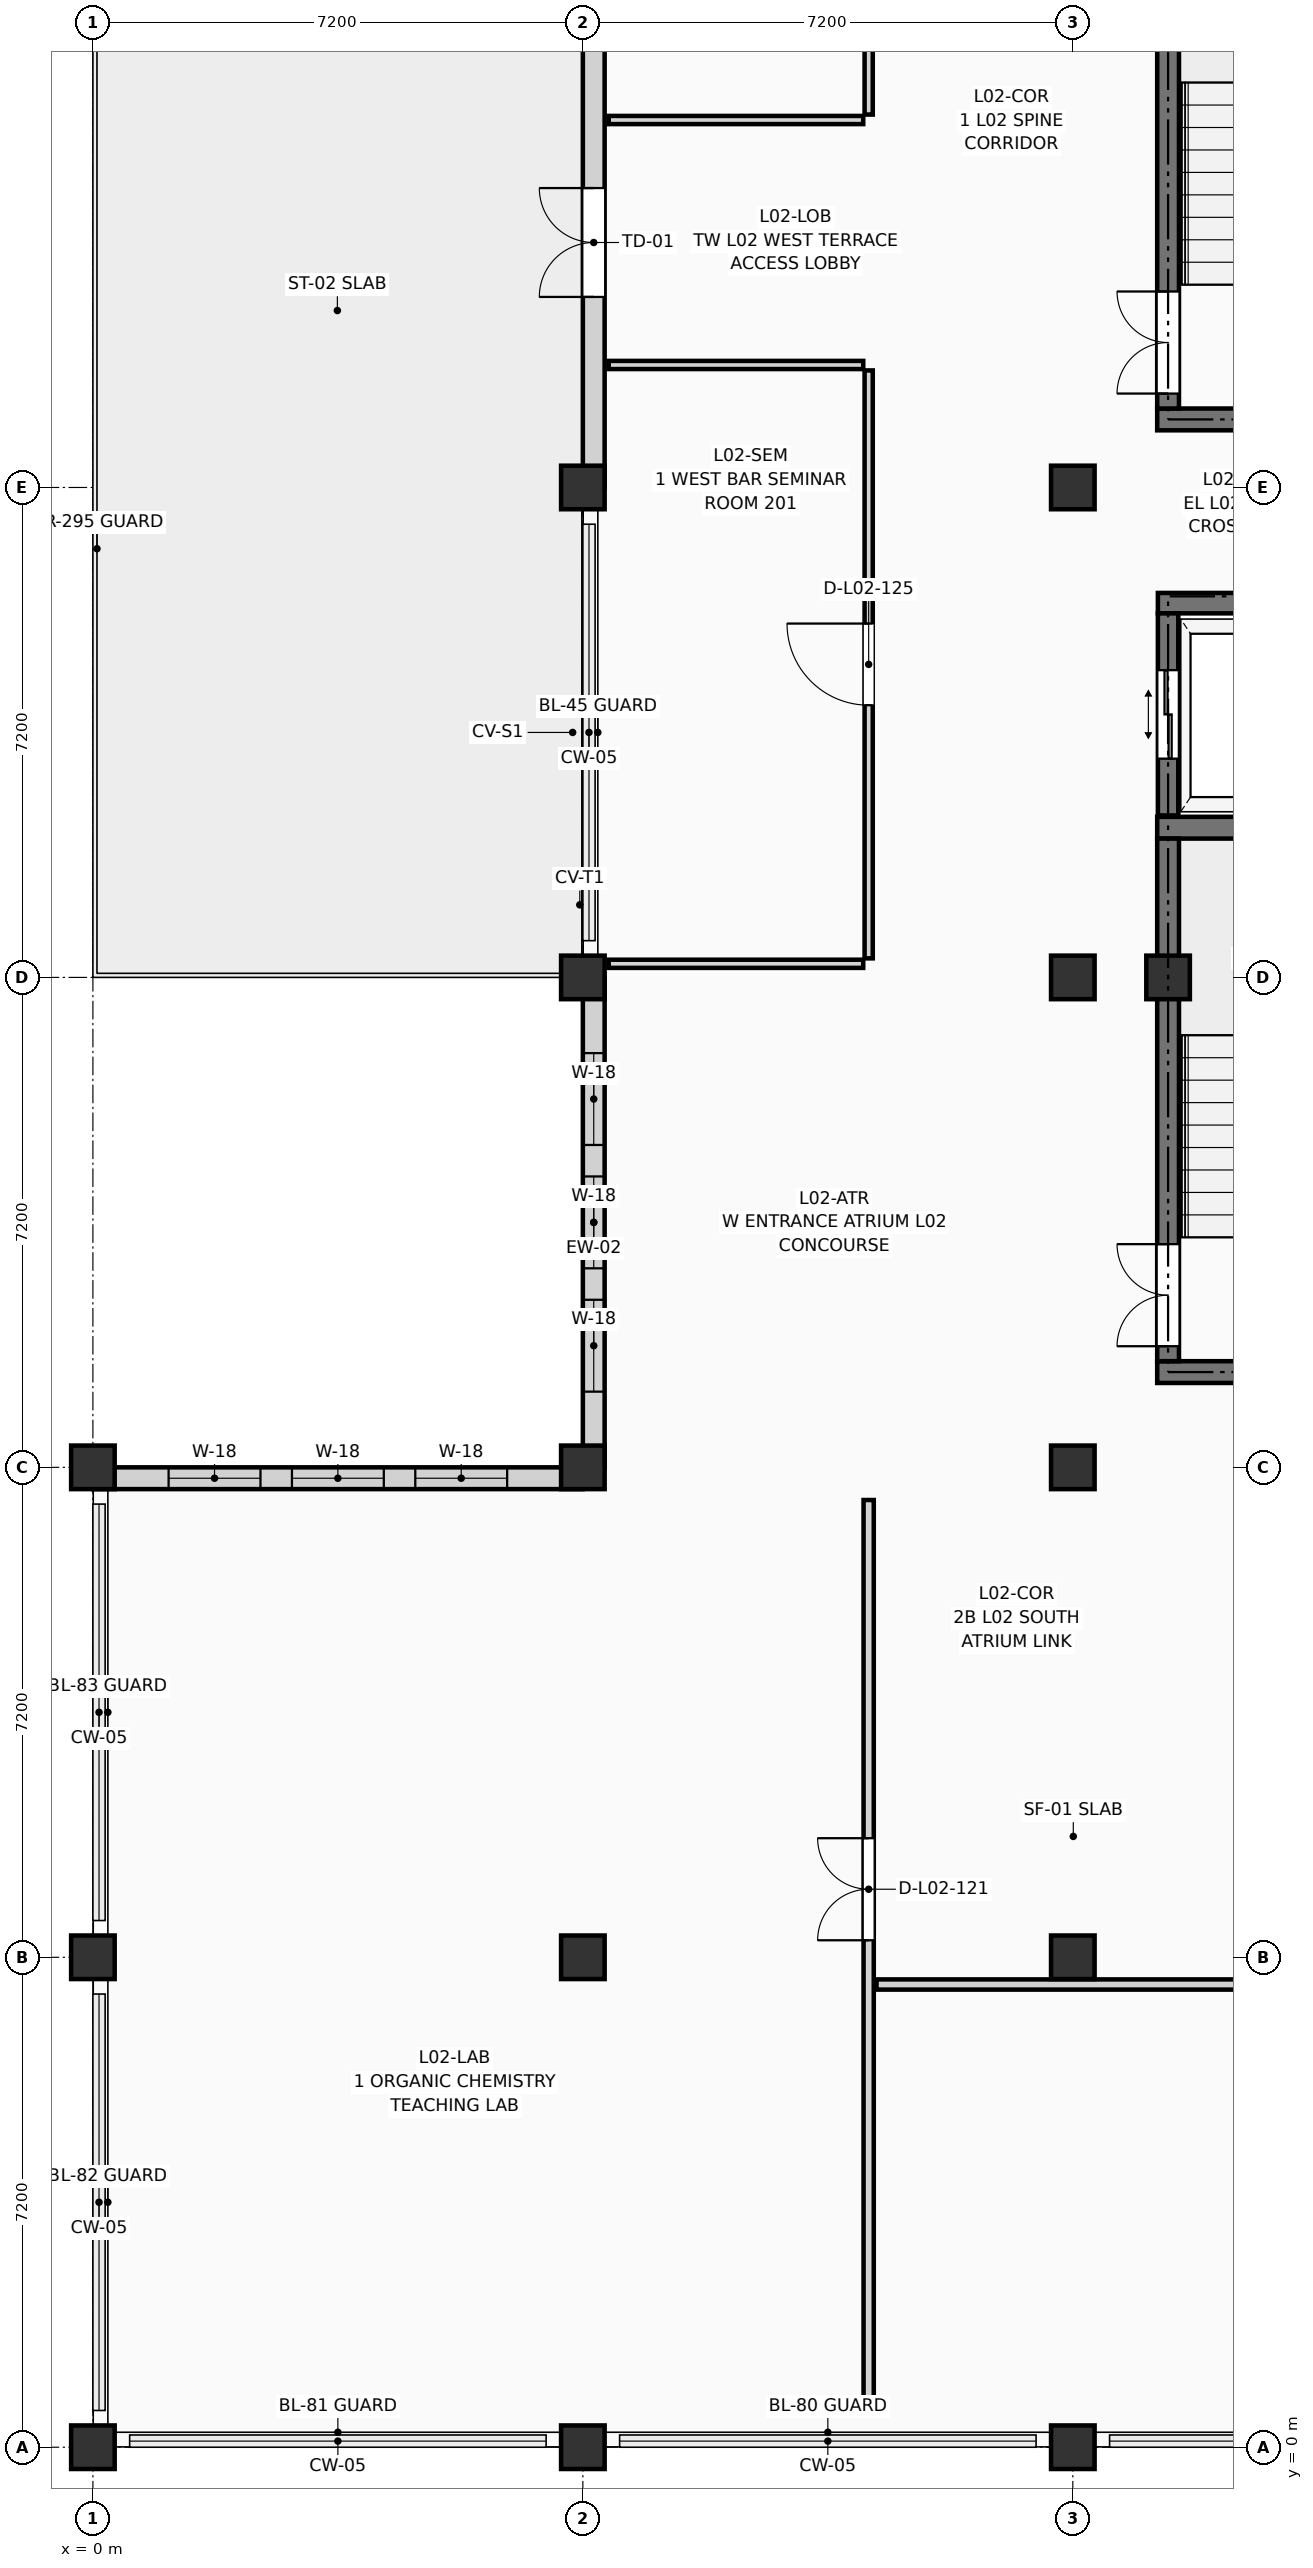
"""IFC4 building model, lengths in metres.
Left out: names, types, materials, properties, quantities, classifications, styles, units other than length and angle.
Written with IfcOpenShell. Run it as: python <this file> out.ifc"""

import sys

from ifc_helpers import new_model, si_unit, direction, frame, frame_2d, origin, origin_2d, place, context, subcontext, project, spatial, rectangle, extrude, element, fill, save


model = new_model("IFC4")
c1 = context("Model", 3, precision=1e-05, world=origin(), true_north=direction((0.0, 1.0)))
c2 = subcontext(c1, "Body", "Model", "MODEL_VIEW")
j1 = project(units=[si_unit("LENGTHUNIT", "METRE"), si_unit("PLANEANGLEUNIT", "RADIAN")], contexts=[c1])
p1 = place(None, origin())
s1 = spatial("IfcSite", under=j1, at=p1, CompositionType="ELEMENT")
p2 = place(p1, origin())
s2 = spatial("IfcBuilding", under=s1, at=p2, CompositionType="ELEMENT")
p3 = place(p2, frame((0.0, 0.0, 8.55)))
s3 = spatial("IfcBuildingStorey", under=s2, at=p3, CompositionType="ELEMENT", Elevation=8.55)
for number, where, z_axis, x_axis in (
    (1, (0.0, 0.0, 0.0), (0.0, 0.0, 1.0), (1.0, 0.0, 0.0)),
    (2, (0.0, 7.2, 0.0), (0.0, 0.0, 1.0), (1.0, 0.0, 0.0)),
    (3, (0.0, 14.4, 0.0), (0.0, 0.0, 1.0), (1.0, 0.0, 0.0)),
    (4, (7.2, 0.0, 0.0), (0.0, 0.0, 1.0), (1.0, 0.0, 0.0)),
    (5, (7.2, 7.2, 0.0), (0.0, 0.0, 1.0), (1.0, 0.0, 0.0)),
    (6, (7.2, 14.4, 0.0), (0.0, 0.0, 1.0), (1.0, 0.0, 0.0)),
    (7, (7.2, 21.6, 0.0), (0.0, 0.0, 1.0), (1.0, 0.0, 0.0)),
    (8, (7.2, 28.8, 0.0), (0.0, 0.0, 1.0), (1.0, 0.0, 0.0)),
    (9, (14.4, 0.0, 0.0), (0.0, 0.0, 1.0), (1.0, 0.0, 0.0)),
    (10, (14.4, 7.2, 0.0), (0.0, 0.0, 1.0), (1.0, 0.0, 0.0)),
    (11, (14.4, 14.4, 0.0), (0.0, 0.0, 1.0), (1.0, 0.0, 0.0)),
    (12, (14.4, 21.6, 0.0), (0.0, 0.0, 1.0), (1.0, 0.0, 0.0)),
    (13, (14.4, 28.8, 0.0), (0.0, 0.0, 1.0), (1.0, 0.0, 0.0)),
    (14, (15.8, 21.6, 0.0), (0.0, 0.0, 1.0), (1.0, 0.0, 0.0)),
):
    element("IfcColumn", number, at=place(p3, frame(where, z_axis=z_axis, x_axis=x_axis)), inside=s3, PredefinedType="COLUMN", context=c2, shape_type="SweptSolid", body=[
        extrude(rectangle(XDim=0.64, YDim=0.64, at=origin_2d()), origin(), (0.0, 0.0, 1.0), 3.6),
    ])
p4 = place(p3, frame((7.36, 14.4, 0.0), z_axis=(0.0, 0.0, 1.0), x_axis=(0.0, 1.0, 0.0)))
e15 = element("IfcWall", 15, at=p4, inside=s3, PredefinedType="SOLIDWALL", context=c2, shape_type="SweptSolid", body=[
    extrude(rectangle(XDim=7.2, YDim=0.32, at=frame_2d((3.6, 0.0))), origin(), (0.0, 0.0, 1.0), 2.84),
])
p5 = place(p4, frame((1.113, 0.0, 0.18)))
e16 = element("IfcOpeningElement", 16, at=p5, cuts=e15, PredefinedType="OPENING", context=c2, shape_type="SweptSolid", body=[
    extrude(rectangle(XDim=1.35, YDim=2.45, at=frame_2d((0.675, 1.225))), frame((0.0, 0.172, 0.0), z_axis=(0.0, -1.0, 0.0), x_axis=(1.0, 0.0, 0.0)), (0.0, 0.0, 1.0), 0.344),
])
p6 = place(p4, frame((2.925, 0.0, 0.18)))
e17 = element("IfcOpeningElement", 17, at=p6, cuts=e15, PredefinedType="OPENING", context=c2, shape_type="SweptSolid", body=[
    extrude(rectangle(XDim=1.35, YDim=2.45, at=frame_2d((0.675, 1.225))), frame((0.0, 0.172, 0.0), z_axis=(0.0, -1.0, 0.0), x_axis=(1.0, 0.0, 0.0)), (0.0, 0.0, 1.0), 0.344),
])
p7 = place(p4, frame((4.738, 0.0, 0.18)))
e18 = element("IfcOpeningElement", 18, at=p7, cuts=e15, PredefinedType="OPENING", context=c2, shape_type="SweptSolid", body=[
    extrude(rectangle(XDim=1.35, YDim=2.45, at=frame_2d((0.675, 1.225))), frame((0.0, 0.172, 0.0), z_axis=(0.0, -1.0, 0.0), x_axis=(1.0, 0.0, 0.0)), (0.0, 0.0, 1.0), 0.344),
])
p8 = place(p3, frame((7.36, 28.8, 0.0), z_axis=(0.0, 0.0, 1.0), x_axis=(0.0, 1.0, 0.0)))
e19 = element("IfcWall", 19, at=p8, inside=s3, PredefinedType="SOLIDWALL", context=c2, shape_type="SweptSolid", body=[
    extrude(rectangle(XDim=7.2, YDim=0.32, at=frame_2d((3.6, 0.0))), origin(), (0.0, 0.0, 1.0), 2.84),
])
p9 = place(p8, frame((2.8, 0.0, 0.0)))
e20 = element("IfcOpeningElement", 20, at=p9, cuts=e19, PredefinedType="OPENING", context=c2, shape_type="SweptSolid", body=[
    extrude(rectangle(XDim=1.6, YDim=2.25, at=frame_2d((0.8, 1.125))), frame((0.0, 0.172, 0.0), z_axis=(0.0, -1.0, 0.0), x_axis=(1.0, 0.0, 0.0)), (0.0, 0.0, 1.0), 0.344),
])
p10 = place(p3, frame((0.0, 14.24, 0.0), z_axis=(0.0, 0.0, 1.0), x_axis=(1.0, 0.0, 0.0)))
e21 = element("IfcWall", 21, at=p10, inside=s3, PredefinedType="SOLIDWALL", context=c2, shape_type="SweptSolid", body=[
    extrude(rectangle(XDim=7.2, YDim=0.32, at=frame_2d((3.6, 0.0))), origin(), (0.0, 0.0, 1.0), 2.84),
])
p11 = place(p10, frame((1.113, 0.0, 0.18)))
e22 = element("IfcOpeningElement", 22, at=p11, cuts=e21, PredefinedType="OPENING", context=c2, shape_type="SweptSolid", body=[
    extrude(rectangle(XDim=1.35, YDim=2.45, at=frame_2d((0.675, 1.225))), frame((0.0, 0.172, 0.0), z_axis=(0.0, -1.0, 0.0), x_axis=(1.0, 0.0, 0.0)), (0.0, 0.0, 1.0), 0.344),
])
p12 = place(p10, frame((2.925, 0.0, 0.18)))
e23 = element("IfcOpeningElement", 23, at=p12, cuts=e21, PredefinedType="OPENING", context=c2, shape_type="SweptSolid", body=[
    extrude(rectangle(XDim=1.35, YDim=2.45, at=frame_2d((0.675, 1.225))), frame((0.0, 0.172, 0.0), z_axis=(0.0, -1.0, 0.0), x_axis=(1.0, 0.0, 0.0)), (0.0, 0.0, 1.0), 0.344),
])
p13 = place(p10, frame((4.738, 0.0, 0.18)))
e24 = element("IfcOpeningElement", 24, at=p13, cuts=e21, PredefinedType="OPENING", context=c2, shape_type="SweptSolid", body=[
    extrude(rectangle(XDim=1.35, YDim=2.45, at=frame_2d((0.675, 1.225))), frame((0.0, 0.172, 0.0), z_axis=(0.0, -1.0, 0.0), x_axis=(1.0, 0.0, 0.0)), (0.0, 0.0, 1.0), 0.344),
])
for number, where, z_axis, x_axis in (
    (25, (15.64, 15.8, 0.0), (0.0, 0.0, 1.0), (1.0, 0.0, 0.0)),
    (26, (15.64, 23.8, 0.0), (0.0, 0.0, 1.0), (1.0, 0.0, 0.0)),
):
    element("IfcWall", number, at=place(p3, frame(where, z_axis=z_axis, x_axis=x_axis)), inside=s3, PredefinedType="SHEAR", context=c2, shape_type="SweptSolid", body=[
        extrude(rectangle(XDim=4.84, YDim=0.32, at=frame_2d((2.42, 0.0))), origin(), (0.0, 0.0, 1.0), 3.39),
    ])
p14 = place(p3, frame((15.8, 15.96, 0.0), z_axis=(0.0, 0.0, 1.0), x_axis=(0.0, 1.0, 0.0)))
e27 = element("IfcWall", 27, at=p14, inside=s3, PredefinedType="SHEAR", context=c2, shape_type="SweptSolid", body=[
    extrude(rectangle(XDim=7.68, YDim=0.32, at=frame_2d((3.84, 0.0))), origin(), (0.0, 0.0, 1.0), 3.39),
])
p15 = place(p14, frame((0.22, 0.0, 0.0)))
e28 = element("IfcOpeningElement", 28, at=p15, cuts=e27, PredefinedType="OPENING", context=c2, shape_type="SweptSolid", body=[
    extrude(rectangle(XDim=1.5, YDim=2.2, at=frame_2d((0.75, 1.1))), frame((0.0, 0.172, 0.0), z_axis=(0.0, -1.0, 0.0), x_axis=(1.0, 0.0, 0.0)), (0.0, 0.0, 1.0), 0.344),
])
p16 = place(p3, frame((15.64, 29.8, 0.0), z_axis=(0.0, 0.0, 1.0), x_axis=(1.0, 0.0, 0.0)))
e29 = element("IfcWall", 29, at=p16, inside=s3, PredefinedType="SHEAR", context=c2, shape_type="SweptSolid", body=[
    extrude(rectangle(XDim=4.84, YDim=0.32, at=frame_2d((2.42, 0.0))), origin(), (0.0, 0.0, 1.0), 3.39),
])
p17 = place(p3, frame((15.8, 29.96, 0.0), z_axis=(0.0, 0.0, 1.0), x_axis=(0.0, 1.0, 0.0)))
e30 = element("IfcWall", 30, at=p17, inside=s3, PredefinedType="SHEAR", context=c2, shape_type="SweptSolid", body=[
    extrude(rectangle(XDim=7.68, YDim=0.32, at=frame_2d((3.84, 0.0))), origin(), (0.0, 0.0, 1.0), 3.39),
])
p18 = place(p17, frame((0.22, 0.0, 0.0)))
e31 = element("IfcOpeningElement", 31, at=p18, cuts=e30, PredefinedType="OPENING", context=c2, shape_type="SweptSolid", body=[
    extrude(rectangle(XDim=1.5, YDim=2.2, at=frame_2d((0.75, 1.1))), frame((0.0, 0.172, 0.0), z_axis=(0.0, -1.0, 0.0), x_axis=(1.0, 0.0, 0.0)), (0.0, 0.0, 1.0), 0.344),
])
p19 = place(p3, frame((15.65, 27.1, 0.0), z_axis=(0.0, 0.0, 1.0), x_axis=(1.0, 0.0, 0.0)))
e32 = element("IfcWall", 32, at=p19, inside=s3, PredefinedType="SHEAR", context=c2, shape_type="SweptSolid", body=[
    extrude(rectangle(XDim=2.56, YDim=0.3, at=frame_2d((1.28, 0.0))), origin(), (0.0, 0.0, 1.0), 3.39),
])
p20 = place(p3, frame((15.8, 23.98, 0.0), z_axis=(0.0, 0.0, 1.0), x_axis=(0.0, 1.0, 0.0)))
e33 = element("IfcWall", 33, at=p20, inside=s3, PredefinedType="SHEAR", context=c2, shape_type="SweptSolid", body=[
    extrude(rectangle(XDim=2.97, YDim=0.3, at=frame_2d((1.485, 0.0))), origin(), (0.0, 0.0, 1.0), 3.39),
])
p21 = place(p20, frame((0.835, 0.0, 0.0)))
e34 = element("IfcOpeningElement", 34, at=p21, cuts=e33, PredefinedType="OPENING", context=c2, shape_type="SweptSolid", body=[
    extrude(rectangle(XDim=1.3, YDim=2.25, at=frame_2d((0.65, 1.125))), frame((0.0, 0.162, 0.0), z_axis=(0.0, -1.0, 0.0), x_axis=(1.0, 0.0, 0.0)), (0.0, 0.0, 1.0), 0.324),
])
p22 = place(p3, frame((11.4, 0.48, 0.0), z_axis=(0.0, 0.0, 1.0), x_axis=(0.0, 1.0, 0.0)))
e35 = element("IfcWall", 35, at=p22, inside=s3, PredefinedType="PARTITIONING", context=c2, shape_type="SweptSolid", body=[
    extrude(rectangle(XDim=13.44, YDim=0.15, at=frame_2d((6.72, 0.0))), origin(), (0.0, 0.0, 1.0), 3.375),
])
p23 = place(p22, frame((6.97, 0.0, 0.0)))
e36 = element("IfcOpeningElement", 36, at=p23, cuts=e35, PredefinedType="OPENING", context=c2, shape_type="SweptSolid", body=[
    extrude(rectangle(XDim=1.5, YDim=2.2, at=frame_2d((0.75, 1.1))), frame((0.0, 0.087, 0.0), z_axis=(0.0, -1.0, 0.0), x_axis=(1.0, 0.0, 0.0)), (0.0, 0.0, 1.0), 0.174),
])
p24 = place(p3, frame((11.515, 6.8, 0.0), z_axis=(0.0, 0.0, 1.0), x_axis=(1.0, 0.0, 0.0)))
e37 = element("IfcWall", 37, at=p24, inside=s3, PredefinedType="PARTITIONING", context=c2, shape_type="SweptSolid", body=[
    extrude(rectangle(XDim=17.005, YDim=0.15, at=frame_2d((8.502, 0.0))), origin(), (0.0, 0.0, 1.0), 3.375),
])
p25 = place(p24, frame((6.497, 0.0, 0.0)))
e38 = element("IfcOpeningElement", 38, at=p25, cuts=e37, PredefinedType="OPENING", context=c2, shape_type="SweptSolid", body=[
    extrude(rectangle(XDim=1.5, YDim=2.2, at=frame_2d((0.75, 1.1))), frame((0.0, 0.087, 0.0), z_axis=(0.0, -1.0, 0.0), x_axis=(1.0, 0.0, 0.0)), (0.0, 0.0, 1.0), 0.174),
])
p26 = place(p3, frame((7.58, 21.8, 0.0), z_axis=(0.0, 0.0, 1.0), x_axis=(1.0, 0.0, 0.0)))
e39 = element("IfcWall", 39, at=p26, inside=s3, PredefinedType="PARTITIONING", context=c2, shape_type="SweptSolid", body=[
    extrude(rectangle(XDim=3.74, YDim=0.12, at=frame_2d((1.87, 0.0))), origin(), (0.0, 0.0, 1.0), 2.595),
])
p27 = place(p3, frame((11.4, 21.88, 0.0), z_axis=(0.0, 0.0, 1.0), x_axis=(0.0, 1.0, 0.0)))
e40 = element("IfcWall", 40, at=p27, inside=s3, PredefinedType="PARTITIONING", context=c2, shape_type="SweptSolid", body=[
    extrude(rectangle(XDim=8.64, YDim=0.12, at=frame_2d((4.32, 0.0))), origin(), (0.0, 0.0, 1.0), 3.375),
])
p28 = place(p27, frame((3.72, 0.0, 0.0)))
e41 = element("IfcOpeningElement", 41, at=p28, cuts=e40, PredefinedType="OPENING", context=c2, shape_type="SweptSolid", body=[
    extrude(rectangle(XDim=1.2, YDim=2.15, at=frame_2d((0.6, 1.075))), frame((0.0, 0.072, 0.0), z_axis=(0.0, -1.0, 0.0), x_axis=(1.0, 0.0, 0.0)), (0.0, 0.0, 1.0), 0.144),
])
for number, where, z_axis, x_axis in (
    (42, (7.58, 30.6, 0.0), (0.0, 0.0, 1.0), (1.0, 0.0, 0.0)),
    (43, (7.58, 34.2, 0.0), (0.0, 0.0, 1.0), (1.0, 0.0, 0.0)),
):
    element("IfcWall", number, at=place(p3, frame(where, z_axis=z_axis, x_axis=x_axis)), inside=s3, PredefinedType="PARTITIONING", context=c2, shape_type="SweptSolid", body=[
        extrude(rectangle(XDim=3.74, YDim=0.12, at=frame_2d((1.87, 0.0))), origin(), (0.0, 0.0, 1.0), 3.375),
    ])
p29 = place(p3, frame((11.4, 34.28, 0.0), z_axis=(0.0, 0.0, 1.0), x_axis=(0.0, 1.0, 0.0)))
e44 = element("IfcWall", 44, at=p29, inside=s3, PredefinedType="PARTITIONING", context=c2, shape_type="SweptSolid", body=[
    extrude(rectangle(XDim=10.84, YDim=0.12, at=frame_2d((5.42, 0.0))), origin(), (0.0, 0.0, 1.0), 3.375),
])
p30 = place(p29, frame((4.82, 0.0, 0.0)))
e45 = element("IfcOpeningElement", 45, at=p30, cuts=e44, PredefinedType="OPENING", context=c2, shape_type="SweptSolid", body=[
    extrude(rectangle(XDim=1.2, YDim=2.15, at=frame_2d((0.6, 1.075))), frame((0.0, 0.072, 0.0), z_axis=(0.0, -1.0, 0.0), x_axis=(1.0, 0.0, 0.0)), (0.0, 0.0, 1.0), 0.144),
])
p31 = place(p5, origin())
e46 = element("IfcWindow", 46, at=p31, inside=s3, PartitioningType="SINGLE_PANEL", PredefinedType="WINDOW", context=c2, shape_type="SweptSolid", body=[
    extrude(rectangle(XDim=1.35, YDim=2.45, at=frame_2d((0.675, 1.225))), frame((0.0, 0.03, 0.0), z_axis=(0.0, -1.0, 0.0), x_axis=(1.0, 0.0, 0.0)), (0.0, 0.0, 1.0), 0.06),
])
fill(e16, e46)
p32 = place(p6, origin())
e47 = element("IfcWindow", 47, at=p32, inside=s3, PartitioningType="SINGLE_PANEL", PredefinedType="WINDOW", context=c2, shape_type="SweptSolid", body=[
    extrude(rectangle(XDim=1.35, YDim=2.45, at=frame_2d((0.675, 1.225))), frame((0.0, 0.03, 0.0), z_axis=(0.0, -1.0, 0.0), x_axis=(1.0, 0.0, 0.0)), (0.0, 0.0, 1.0), 0.06),
])
fill(e17, e47)
p33 = place(p7, origin())
e48 = element("IfcWindow", 48, at=p33, inside=s3, PartitioningType="SINGLE_PANEL", PredefinedType="WINDOW", context=c2, shape_type="SweptSolid", body=[
    extrude(rectangle(XDim=1.35, YDim=2.45, at=frame_2d((0.675, 1.225))), frame((0.0, 0.03, 0.0), z_axis=(0.0, -1.0, 0.0), x_axis=(1.0, 0.0, 0.0)), (0.0, 0.0, 1.0), 0.06),
])
fill(e18, e48)
p34 = place(p9, origin())
e49 = element("IfcDoor", 49, at=p34, inside=s3, OperationType="DOUBLE_DOOR_SINGLE_SWING", PredefinedType="DOOR", context=c2, shape_type="SweptSolid", body=[
    extrude(rectangle(XDim=1.6, YDim=2.25, at=frame_2d((0.8, 1.125))), frame((0.0, 0.025, 0.0), z_axis=(0.0, -1.0, 0.0), x_axis=(1.0, 0.0, 0.0)), (0.0, 0.0, 1.0), 0.05),
])
fill(e20, e49)
p35 = place(p11, origin())
e50 = element("IfcWindow", 50, at=p35, inside=s3, PartitioningType="SINGLE_PANEL", PredefinedType="WINDOW", context=c2, shape_type="SweptSolid", body=[
    extrude(rectangle(XDim=1.35, YDim=2.45, at=frame_2d((0.675, 1.225))), frame((0.0, 0.03, 0.0), z_axis=(0.0, -1.0, 0.0), x_axis=(1.0, 0.0, 0.0)), (0.0, 0.0, 1.0), 0.06),
])
fill(e22, e50)
p36 = place(p12, origin())
e51 = element("IfcWindow", 51, at=p36, inside=s3, PartitioningType="SINGLE_PANEL", PredefinedType="WINDOW", context=c2, shape_type="SweptSolid", body=[
    extrude(rectangle(XDim=1.35, YDim=2.45, at=frame_2d((0.675, 1.225))), frame((0.0, 0.03, 0.0), z_axis=(0.0, -1.0, 0.0), x_axis=(1.0, 0.0, 0.0)), (0.0, 0.0, 1.0), 0.06),
])
fill(e23, e51)
p37 = place(p13, origin())
e52 = element("IfcWindow", 52, at=p37, inside=s3, PartitioningType="SINGLE_PANEL", PredefinedType="WINDOW", context=c2, shape_type="SweptSolid", body=[
    extrude(rectangle(XDim=1.35, YDim=2.45, at=frame_2d((0.675, 1.225))), frame((0.0, 0.03, 0.0), z_axis=(0.0, -1.0, 0.0), x_axis=(1.0, 0.0, 0.0)), (0.0, 0.0, 1.0), 0.06),
])
fill(e24, e52)
p38 = place(p15, origin())
e53 = element("IfcDoor", 53, at=p38, inside=s3, OperationType="DOUBLE_DOOR_SINGLE_SWING", PredefinedType="DOOR", context=c2, shape_type="SweptSolid", body=[
    extrude(rectangle(XDim=1.5, YDim=2.2, at=frame_2d((0.75, 1.1))), frame((0.0, 0.025, 0.0), z_axis=(0.0, -1.0, 0.0), x_axis=(1.0, 0.0, 0.0)), (0.0, 0.0, 1.0), 0.05),
])
fill(e28, e53)
p39 = place(p18, origin())
e54 = element("IfcDoor", 54, at=p39, inside=s3, OperationType="DOUBLE_DOOR_SINGLE_SWING", PredefinedType="DOOR", context=c2, shape_type="SweptSolid", body=[
    extrude(rectangle(XDim=1.5, YDim=2.2, at=frame_2d((0.75, 1.1))), frame((0.0, 0.025, 0.0), z_axis=(0.0, -1.0, 0.0), x_axis=(1.0, 0.0, 0.0)), (0.0, 0.0, 1.0), 0.05),
])
fill(e31, e54)
p40 = place(p21, origin())
e55 = element("IfcDoor", 55, at=p40, inside=s3, OperationType="DOUBLE_DOOR_SLIDING", PredefinedType="DOOR", context=c2, shape_type="SweptSolid", body=[
    extrude(rectangle(XDim=1.3, YDim=2.25, at=frame_2d((0.65, 1.125))), frame((0.0, 0.025, 0.0), z_axis=(0.0, -1.0, 0.0), x_axis=(1.0, 0.0, 0.0)), (0.0, 0.0, 1.0), 0.05),
])
fill(e34, e55)
p41 = place(p23, origin())
e56 = element("IfcDoor", 56, at=p41, inside=s3, OperationType="DOUBLE_DOOR_SINGLE_SWING", PredefinedType="DOOR", context=c2, shape_type="SweptSolid", body=[
    extrude(rectangle(XDim=1.5, YDim=2.2, at=frame_2d((0.75, 1.1))), frame((0.0, 0.025, 0.0), z_axis=(0.0, -1.0, 0.0), x_axis=(1.0, 0.0, 0.0)), (0.0, 0.0, 1.0), 0.05),
])
fill(e36, e56)
p42 = place(p28, origin())
e57 = element("IfcDoor", 57, at=p42, inside=s3, OperationType="SINGLE_SWING_RIGHT", PredefinedType="DOOR", context=c2, shape_type="SweptSolid", body=[
    extrude(rectangle(XDim=1.2, YDim=2.15, at=frame_2d((0.6, 1.075))), frame((0.0, 0.025, 0.0), z_axis=(0.0, -1.0, 0.0), x_axis=(1.0, 0.0, 0.0)), (0.0, 0.0, 1.0), 0.05),
])
fill(e41, e57)
save(model, sys.argv[1])
